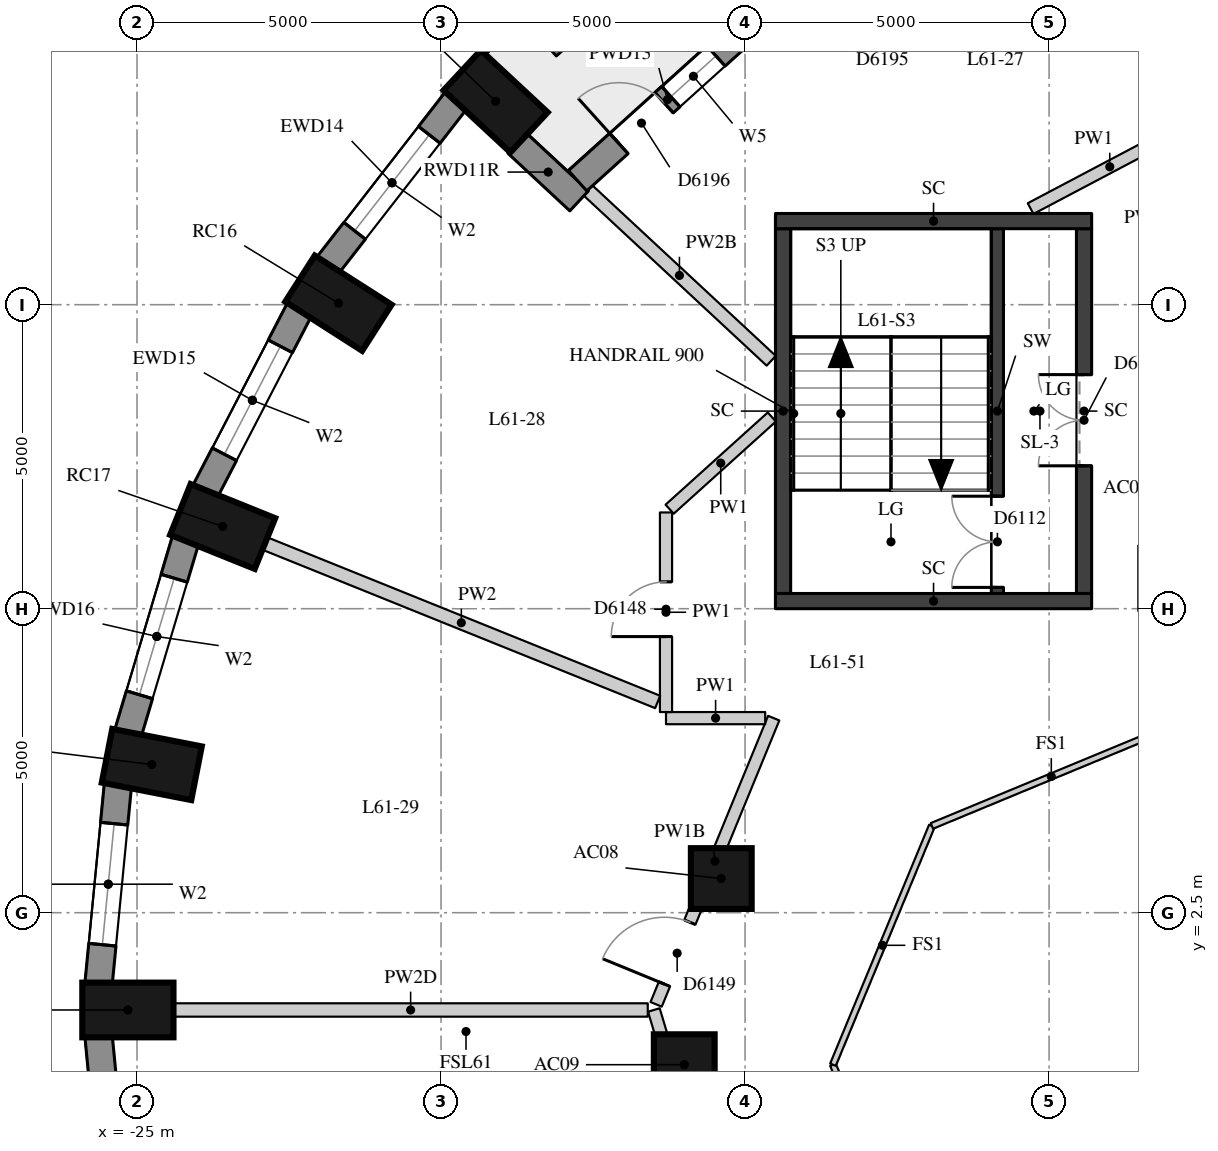
"""IFC4 building model, lengths in metres.
Left out: names, types, materials, properties, quantities, classifications, styles, units other than length and angle.
Written with IfcOpenShell. Run it as: python <this file> out.ifc"""

import sys

from ifc_helpers import new_model, si_unit, direction, frame, frame_2d, origin, origin_2d, place, context, subcontext, project, spatial, rectangle, extrude, element, fill, save


model = new_model("IFC4")
c1 = context("Model", 3, precision=1e-05, world=origin(), true_north=direction((0.0, 1.0)))
c2 = subcontext(c1, "Body", "Model", "MODEL_VIEW")
j1 = project(units=[si_unit("LENGTHUNIT", "METRE"), si_unit("PLANEANGLEUNIT", "RADIAN")], contexts=[c1])
p1 = place(None, origin())
s1 = spatial("IfcSite", under=j1, at=p1, CompositionType="ELEMENT")
p2 = place(p1, origin())
s2 = spatial("IfcBuilding", under=s1, at=p2, CompositionType="ELEMENT")
p3 = place(p2, frame((0.0, 0.0, 215.6)))
s3 = spatial("IfcBuildingStorey", under=s2, at=p3, CompositionType="ELEMENT", Elevation=215.6)
for number, where, z_axis, x_axis in (
    (1, (-19.102, 15.845, 0.0), (0.0, 0.0, 1.0), (-0.732, 0.681, 0.0)),
    (2, (-21.687, 12.525, 0.0), (0.0, 0.0, 1.0), (-0.842, 0.539, 0.0)),
    (3, (-23.591, 8.852, 0.0), (0.0, 0.0, 1.0), (-0.927, 0.374, 0.0)),
    (4, (-24.757, 4.937, 0.0), (0.0, 0.0, 1.0), (-0.981, 0.192, 0.0)),
    (5, (-25.15, 0.9, 0.0), (0.0, 0.0, 1.0), (-1.0, 0.0, 0.0)),
):
    element("IfcColumn", number, at=place(p3, frame(where, z_axis=z_axis, x_axis=x_axis)), inside=s3, PredefinedType="COLUMN", context=c2, shape_type="SweptSolid", body=[
        extrude(rectangle(XDim=1.5, YDim=0.9, at=origin_2d()), origin(), (0.0, 0.0, 1.0), 3.3),
    ])
for number, where, z_axis, x_axis in (
    (6, (-15.391, 3.062, 0.0), (0.0, 0.0, 1.0), (1.0, 0.0, 0.0)),
    (7, (-16.0, 0.0, 0.0), (0.0, 0.0, 1.0), (1.0, 0.0, 0.0)),
):
    element("IfcColumn", number, at=place(p3, frame(where, z_axis=z_axis, x_axis=x_axis)), inside=s3, PredefinedType="COLUMN", context=c2, shape_type="SweptSolid", body=[
        extrude(rectangle(XDim=1.0, YDim=1.0, at=origin_2d()), origin(), (0.0, 0.0, 1.0), 3.3),
    ])
p4 = place(p3, frame((-19.751, 15.861, 0.0), z_axis=(0.0, 0.0, 1.0), x_axis=(-0.614220816451, -0.789134201919, 0.0)))
e8 = element("IfcWall", 8, at=p4, inside=s3, PredefinedType="SOLIDWALL", context=c2, shape_type="SweptSolid", body=[
    extrude(rectangle(XDim=3.438, YDim=0.45, at=frame_2d((1.719, 0.0))), origin(), (0.0, 0.0, 1.0), 3.02),
])
p5 = place(p4, frame((0.719, 0.0, 0.4)))
e9 = element("IfcOpeningElement", 9, at=p5, cuts=e8, PredefinedType="OPENING", context=c2, shape_type="SweptSolid", body=[
    extrude(rectangle(XDim=2.0, YDim=1.75, at=frame_2d((1.0, 0.875))), frame((0.0, 0.235, 0.0), z_axis=(0.0, -1.0, 0.0), x_axis=(1.0, 0.0, 0.0)), (0.0, 0.0, 1.0), 0.47),
])
p6 = place(p3, frame((-22.327, 12.424, 0.0), z_axis=(0.0, 0.0, 1.0), x_axis=(-0.460232593174, -0.887798378113, 0.0)))
e10 = element("IfcWall", 10, at=p6, inside=s3, PredefinedType="SOLIDWALL", context=c2, shape_type="SweptSolid", body=[
    extrude(rectangle(XDim=3.371, YDim=0.45, at=frame_2d((1.685, 0.0))), origin(), (0.0, 0.0, 1.0), 3.02),
])
p7 = place(p6, frame((0.685, 0.0, 0.4)))
e11 = element("IfcOpeningElement", 11, at=p7, cuts=e10, PredefinedType="OPENING", context=c2, shape_type="SweptSolid", body=[
    extrude(rectangle(XDim=2.0, YDim=1.75, at=frame_2d((1.0, 0.875))), frame((0.0, 0.235, 0.0), z_axis=(0.0, -1.0, 0.0), x_axis=(1.0, 0.0, 0.0)), (0.0, 0.0, 1.0), 0.47),
])
p8 = place(p3, frame((-24.2, 8.634, 0.0), z_axis=(0.0, 0.0, 1.0), x_axis=(-0.285444972963, -0.958395099847, 0.0)))
e12 = element("IfcWall", 12, at=p8, inside=s3, PredefinedType="SOLIDWALL", context=c2, shape_type="SweptSolid", body=[
    extrude(rectangle(XDim=3.32, YDim=0.45, at=frame_2d((1.66, 0.0))), origin(), (0.0, 0.0, 1.0), 3.02),
])
p9 = place(p8, frame((0.66, 0.0, 0.4)))
e13 = element("IfcOpeningElement", 13, at=p9, cuts=e12, PredefinedType="OPENING", context=c2, shape_type="SweptSolid", body=[
    extrude(rectangle(XDim=2.0, YDim=1.75, at=frame_2d((1.0, 0.875))), frame((0.0, 0.235, 0.0), z_axis=(0.0, -1.0, 0.0), x_axis=(1.0, 0.0, 0.0)), (0.0, 0.0, 1.0), 0.47),
])
p10 = place(p3, frame((-25.313, 4.608, 0.0), z_axis=(0.0, 0.0, 1.0), x_axis=(-0.096824116835, -0.995301507283, 0.0)))
e14 = element("IfcWall", 14, at=p10, inside=s3, PredefinedType="SOLIDWALL", context=c2, shape_type="SweptSolid", body=[
    extrude(rectangle(XDim=3.293, YDim=0.45, at=frame_2d((1.646, 0.0))), origin(), (0.0, 0.0, 1.0), 3.02),
])
p11 = place(p10, frame((0.646, 0.0, 0.4)))
e15 = element("IfcOpeningElement", 15, at=p11, cuts=e14, PredefinedType="OPENING", context=c2, shape_type="SweptSolid", body=[
    extrude(rectangle(XDim=2.0, YDim=1.75, at=frame_2d((1.0, 0.875))), frame((0.0, 0.235, 0.0), z_axis=(0.0, -1.0, 0.0), x_axis=(1.0, 0.0, 0.0)), (0.0, 0.0, 1.0), 0.47),
])
p12 = place(p3, frame((-25.632, 0.47, 0.0), z_axis=(0.0, 0.0, 1.0), x_axis=(0.096816972749, -0.995302202242, 0.0)))
e16 = element("IfcWall", 16, at=p12, inside=s3, PredefinedType="SOLIDWALL", context=c2, shape_type="SweptSolid", body=[
    extrude(rectangle(XDim=3.293, YDim=0.45, at=frame_2d((1.646, 0.0))), origin(), (0.0, 0.0, 1.0), 3.02),
])
p13 = place(p12, frame((0.646, 0.0, 0.4)))
e17 = element("IfcOpeningElement", 17, at=p13, cuts=e16, PredefinedType="OPENING", context=c2, shape_type="SweptSolid", body=[
    extrude(rectangle(XDim=2.0, YDim=1.75, at=frame_2d((1.0, 0.875))), frame((0.0, 0.235, 0.0), z_axis=(0.0, -1.0, 0.0), x_axis=(1.0, 0.0, 0.0)), (0.0, 0.0, 1.0), 0.47),
])
p14 = place(p3, frame((-18.747, 15.155, 0.0), z_axis=(0.0, 0.0, 1.0), x_axis=(0.732349544388, -0.680928883831, 0.0)))
e18 = element("IfcWall", 18, at=p14, inside=s3, PredefinedType="SOLIDWALL", context=c2, shape_type="SweptSolid", body=[
    extrude(rectangle(XDim=1.391, YDim=0.45, at=frame_2d((0.696, 0.0))), origin(), (0.0, 0.0, 1.0), 2.57),
])
p15 = place(p3, frame((-14.799, 17.205, 0.0), z_axis=(0.0, 0.0, 1.0), x_axis=(-0.742488361714, -0.669858964798, 0.0)))
e19 = element("IfcWall", 19, at=p15, inside=s3, PredefinedType="SOLIDWALL", context=c2, shape_type="SweptSolid", body=[
    extrude(rectangle(XDim=3.98, YDim=0.45, at=frame_2d((1.99, 0.0))), origin(), (0.0, 0.0, 1.0), 3.02),
])
p16 = place(p15, frame((0.915, 0.0, 0.4)))
e20 = element("IfcOpeningElement", 20, at=p16, cuts=e19, PredefinedType="OPENING", context=c2, shape_type="SweptSolid", body=[
    extrude(rectangle(XDim=1.0, YDim=1.75, at=frame_2d((0.5, 0.875))), frame((0.0, 0.235, 0.0), z_axis=(0.0, -1.0, 0.0), x_axis=(1.0, 0.0, 0.0)), (0.0, 0.0, 1.0), 0.47),
])
p17 = place(p15, frame((2.065, 0.0, 0.0)))
e21 = element("IfcOpeningElement", 21, at=p17, cuts=e19, PredefinedType="OPENING", context=c2, shape_type="SweptSolid", body=[
    extrude(rectangle(XDim=1.0, YDim=2.15, at=frame_2d((0.5, 1.075))), frame((0.0, 0.235, 0.0), z_axis=(0.0, -1.0, 0.0), x_axis=(1.0, 0.0, 0.0)), (0.0, 0.0, 1.0), 0.47),
])
p18 = place(p3, frame((-17.0, 18.055, 0.0), z_axis=(0.0, 0.0, 1.0), x_axis=(-0.743422275143, -0.668822338758, 0.0)))
e22 = element("IfcWall", 22, at=p18, inside=s3, PredefinedType="USERDEFINED", context=c2, shape_type="SweptSolid", body=[
    extrude(rectangle(XDim=1.8, YDim=0.7, at=frame_2d((0.9, 0.0))), origin(), (0.0, 0.0, 1.0), 0.75),
])
p19 = place(p3, frame((-10.85, 7.75, 0.0), z_axis=(0.0, 0.0, 1.0), x_axis=(0.0, 1.0, 0.0)))
e23 = element("IfcWall", 23, at=p19, inside=s3, PredefinedType="SHEAR", context=c2, shape_type="SweptSolid", body=[
    extrude(rectangle(XDim=6.0, YDim=0.2, at=frame_2d((3.0, 0.0))), origin(), (0.0, 0.0, 1.0), 3.02),
])
p20 = place(p19, frame((0.1, 0.0, 0.0)))
e24 = element("IfcOpeningElement", 24, at=p20, cuts=e23, PredefinedType="OPENING", context=c2, shape_type="SweptSolid", body=[
    extrude(rectangle(XDim=1.5, YDim=2.1, at=frame_2d((0.75, 1.05))), frame((0.0, 0.11, 0.0), z_axis=(0.0, -1.0, 0.0), x_axis=(1.0, 0.0, 0.0)), (0.0, 0.0, 1.0), 0.22),
])
p21 = place(p3, frame((-14.375, 7.75, -0.28), z_axis=(0.0, 0.0, 1.0), x_axis=(0.0, 1.0, 0.0)))
e25 = element("IfcWall", 25, at=p21, inside=s3, PredefinedType="SHEAR", context=c2, shape_type="SweptSolid", body=[
    extrude(rectangle(XDim=6.0, YDim=0.25, at=frame_2d((3.0, 0.0))), origin(), (0.0, 0.0, 1.0), 3.3),
])
p22 = place(p3, frame((-9.425, 7.75, -0.28), z_axis=(0.0, 0.0, 1.0), x_axis=(0.0, 1.0, 0.0)))
e26 = element("IfcWall", 26, at=p22, inside=s3, PredefinedType="SHEAR", context=c2, shape_type="SweptSolid", body=[
    extrude(rectangle(XDim=6.0, YDim=0.25, at=frame_2d((3.0, 0.0))), origin(), (0.0, 0.0, 1.0), 3.3),
])
p23 = place(p22, frame((2.1, 0.0, 0.28)))
e27 = element("IfcOpeningElement", 27, at=p23, cuts=e26, PredefinedType="OPENING", context=c2, shape_type="SweptSolid", body=[
    extrude(rectangle(XDim=1.5, YDim=2.1, at=frame_2d((0.75, 1.05))), frame((0.0, 0.135, 0.0), z_axis=(0.0, -1.0, 0.0), x_axis=(1.0, 0.0, 0.0)), (0.0, 0.0, 1.0), 0.27),
])
for number, where, z_axis, x_axis in (
    (28, (-14.5, 13.875, -0.28), (0.0, 0.0, 1.0), (1.0, 0.0, 0.0)),
    (29, (-14.5, 7.625, -0.28), (0.0, 0.0, 1.0), (1.0, 0.0, 0.0)),
):
    element("IfcWall", number, at=place(p3, frame(where, z_axis=z_axis, x_axis=x_axis)), inside=s3, PredefinedType="SHEAR", context=c2, shape_type="SweptSolid", body=[
        extrude(rectangle(XDim=5.2, YDim=0.25, at=frame_2d((2.6, 0.0))), origin(), (0.0, 0.0, 1.0), 3.3),
    ])
p24 = place(p3, frame((-14.56, -5.567, 0.0), z_axis=(0.0, 0.0, 1.0), x_axis=(-0.287410918602, 0.95780737305, 0.0)))
e30 = element("IfcWall", 30, at=p24, inside=s3, PredefinedType="PARTITIONING", context=c2, shape_type="SweptSolid", body=[
    extrude(rectangle(XDim=6.751, YDim=0.2, at=frame_2d((3.376, 0.0))), origin(), (0.0, 0.0, 1.0), 2.52),
])
p25 = place(p24, frame((3.561, 0.0, 0.0)))
e31 = element("IfcOpeningElement", 31, at=p25, cuts=e30, PredefinedType="OPENING", context=c2, shape_type="SweptSolid", body=[
    extrude(rectangle(XDim=1.1, YDim=2.1, at=frame_2d((0.55, 1.05))), frame((0.0, 0.11, 0.0), z_axis=(0.0, -1.0, 0.0), x_axis=(1.0, 0.0, 0.0)), (0.0, 0.0, 1.0), 0.22),
])
p26 = place(p24, frame((0.41, 0.0, 0.0)))
e32 = element("IfcOpeningElement", 32, at=p26, cuts=e30, PredefinedType="OPENING", context=c2, shape_type="SweptSolid", body=[
    extrude(rectangle(XDim=1.2, YDim=2.1, at=frame_2d((0.6, 1.05))), frame((0.0, 0.11, 0.0), z_axis=(0.0, -1.0, 0.0), x_axis=(1.0, 0.0, 0.0)), (0.0, 0.0, 1.0), 0.22),
])
p27 = place(p3, frame((-16.462, 0.993, 0.0), z_axis=(0.0, 0.0, 1.0), x_axis=(0.37991958703, 0.925019517303, 0.0)))
e33 = element("IfcWall", 33, at=p27, inside=s3, PredefinedType="PARTITIONING", context=c2, shape_type="SweptSolid", body=[
    extrude(rectangle(XDim=5.089, YDim=0.2, at=frame_2d((2.544, 0.0))), origin(), (0.0, 0.0, 1.0), 2.52),
])
p28 = place(p27, frame((0.36, 0.0, 0.0)))
e34 = element("IfcOpeningElement", 34, at=p28, cuts=e33, PredefinedType="OPENING", context=c2, shape_type="SweptSolid", body=[
    extrude(rectangle(XDim=1.1, YDim=2.1, at=frame_2d((0.55, 1.05))), frame((0.0, 0.11, 0.0), z_axis=(0.0, -1.0, 0.0), x_axis=(1.0, 0.0, 0.0)), (0.0, 0.0, 1.0), 0.22),
])
p29 = place(p3, frame((-14.669, 5.7, 0.0), z_axis=(0.0, 0.0, 1.0), x_axis=(-1.0, 0.0, 0.0)))
e35 = element("IfcWall", 35, at=p29, inside=s3, PredefinedType="PARTITIONING", context=c2, shape_type="SweptSolid", body=[
    extrude(rectangle(XDim=1.631, YDim=0.2, at=frame_2d((0.815, 0.0))), origin(), (0.0, 0.0, 1.0), 3.02),
])
p30 = place(p3, frame((-16.3, 5.8, 0.0), z_axis=(0.0, 0.0, 1.0), x_axis=(0.0, 1.0, 0.0)))
e36 = element("IfcWall", 36, at=p30, inside=s3, PredefinedType="PARTITIONING", context=c2, shape_type="SweptSolid", body=[
    extrude(rectangle(XDim=3.283, YDim=0.2, at=frame_2d((1.641, 0.0))), origin(), (0.0, 0.0, 1.0), 3.02),
])
p31 = place(p30, frame((1.241, 0.0, 0.0)))
e37 = element("IfcOpeningElement", 37, at=p31, cuts=e36, PredefinedType="OPENING", context=c2, shape_type="SweptSolid", body=[
    extrude(rectangle(XDim=0.9, YDim=2.1, at=frame_2d((0.45, 1.05))), frame((0.0, 0.11, 0.0), z_axis=(0.0, -1.0, 0.0), x_axis=(1.0, 0.0, 0.0)), (0.0, 0.0, 1.0), 0.22),
])
p32 = place(p3, frame((-16.24, 9.136, 0.0), z_axis=(0.0, 0.0, 1.0), x_axis=(0.74251608424, 0.66982823518, 0.0)))
e38 = element("IfcWall", 38, at=p32, inside=s3, PredefinedType="PARTITIONING", context=c2, shape_type="SweptSolid", body=[
    extrude(rectangle(XDim=2.264, YDim=0.2, at=frame_2d((1.132, 0.0))), origin(), (0.0, 0.0, 1.0), 3.02),
])
p33 = place(p3, frame((-10.304, 14.081, 0.0), z_axis=(0.0, 0.0, 1.0), x_axis=(0.884325802624, 0.466870297635, 0.0)))
e39 = element("IfcWall", 39, at=p33, inside=s3, PredefinedType="PARTITIONING", context=c2, shape_type="SweptSolid", body=[
    extrude(rectangle(XDim=2.945, YDim=0.2, at=frame_2d((1.472, 0.0))), origin(), (0.0, 0.0, 1.0), 3.02),
])
p34 = place(p3, frame((-17.589, 14.385, 0.0), z_axis=(0.0, 0.0, 1.0), x_axis=(0.732287016614, -0.680996127227, 0.0)))
e40 = element("IfcWall", 40, at=p34, inside=s3, PredefinedType="PARTITIONING", context=c2, shape_type="SweptSolid", body=[
    extrude(rectangle(XDim=4.122, YDim=0.22, at=frame_2d((2.061, 0.0))), origin(), (0.0, 0.0, 1.0), 2.57),
])
p35 = place(p3, frame((-22.896, 8.571, 0.0), z_axis=(0.0, 0.0, 1.0), x_axis=(0.927387137769, -0.374103056256, 0.0)))
e41 = element("IfcWall", 41, at=p35, inside=s3, PredefinedType="PARTITIONING", context=c2, shape_type="SweptSolid", body=[
    extrude(rectangle(XDim=6.964, YDim=0.22, at=frame_2d((3.482, 0.0))), origin(), (0.0, 0.0, 1.0), 3.02),
])
p36 = place(p3, frame((-24.4, 0.9, 0.0), z_axis=(0.0, 0.0, 1.0), x_axis=(1.0, 0.0, 0.0)))
e42 = element("IfcWall", 42, at=p36, inside=s3, PredefinedType="PARTITIONING", context=c2, shape_type="SweptSolid", body=[
    extrude(rectangle(XDim=7.8, YDim=0.22, at=frame_2d((3.9, 0.0))), origin(), (0.0, 0.0, 1.0), 2.47),
])
for number, where, z_axis, x_axis in (
    (43, (-11.927, -3.927, 0.0), (0.0, 0.0, 1.0), (-0.383, 0.924, 0.0)),
    (44, (-13.554, 0.0, 0.0), (0.0, 0.0, 1.0), (0.383, 0.924, 0.0)),
    (45, (-11.927, 3.927, 0.0), (0.0, 0.0, 1.0), (0.924, 0.383, 0.0)),
):
    element("IfcWall", number, at=place(p3, frame(where, z_axis=z_axis, x_axis=x_axis)), inside=s3, PredefinedType="PARTITIONING", context=c2, shape_type="SweptSolid", body=[
        extrude(rectangle(XDim=4.251, YDim=0.1, at=frame_2d((2.125, 0.0))), origin(), (0.0, 0.0, 1.0), 3.02),
    ])
p37 = place(p5, origin())
e46 = element("IfcWindow", 46, at=p37, inside=s3, PartitioningType="SINGLE_PANEL", PredefinedType="WINDOW", context=c2, shape_type="SweptSolid", body=[
    extrude(rectangle(XDim=2.0, YDim=1.75, at=frame_2d((1.0, 0.875))), frame((0.0, 0.035, 0.0), z_axis=(0.0, -1.0, 0.0), x_axis=(1.0, 0.0, 0.0)), (0.0, 0.0, 1.0), 0.06),
])
fill(e9, e46)
p38 = place(p7, origin())
e47 = element("IfcWindow", 47, at=p38, inside=s3, PartitioningType="SINGLE_PANEL", PredefinedType="WINDOW", context=c2, shape_type="SweptSolid", body=[
    extrude(rectangle(XDim=2.0, YDim=1.75, at=frame_2d((1.0, 0.875))), frame((0.0, 0.035, 0.0), z_axis=(0.0, -1.0, 0.0), x_axis=(1.0, 0.0, 0.0)), (0.0, 0.0, 1.0), 0.06),
])
fill(e11, e47)
p39 = place(p9, origin())
e48 = element("IfcWindow", 48, at=p39, inside=s3, PartitioningType="SINGLE_PANEL", PredefinedType="WINDOW", context=c2, shape_type="SweptSolid", body=[
    extrude(rectangle(XDim=2.0, YDim=1.75, at=frame_2d((1.0, 0.875))), frame((0.0, 0.035, 0.0), z_axis=(0.0, -1.0, 0.0), x_axis=(1.0, 0.0, 0.0)), (0.0, 0.0, 1.0), 0.06),
])
fill(e13, e48)
p40 = place(p11, origin())
e49 = element("IfcWindow", 49, at=p40, inside=s3, PartitioningType="SINGLE_PANEL", PredefinedType="WINDOW", context=c2, shape_type="SweptSolid", body=[
    extrude(rectangle(XDim=2.0, YDim=1.75, at=frame_2d((1.0, 0.875))), frame((0.0, 0.035, 0.0), z_axis=(0.0, -1.0, 0.0), x_axis=(1.0, 0.0, 0.0)), (0.0, 0.0, 1.0), 0.06),
])
fill(e15, e49)
p41 = place(p16, origin())
e50 = element("IfcWindow", 50, at=p41, inside=s3, PartitioningType="SINGLE_PANEL", PredefinedType="WINDOW", context=c2, shape_type="SweptSolid", body=[
    extrude(rectangle(XDim=1.0, YDim=1.75, at=frame_2d((0.5, 0.875))), frame((0.0, 0.035, 0.0), z_axis=(0.0, -1.0, 0.0), x_axis=(1.0, 0.0, 0.0)), (0.0, 0.0, 1.0), 0.06),
])
fill(e20, e50)
p42 = place(p17, frame((1.0, 0.0, 0.0), z_axis=(0.0, 0.0, 1.0), x_axis=(-1.0, 0.0, 0.0)))
e51 = element("IfcDoor", 51, at=p42, inside=s3, OperationType="SINGLE_SWING_LEFT", PredefinedType="DOOR", context=c2, shape_type="SweptSolid", body=[
    extrude(rectangle(XDim=1.0, YDim=2.15, at=frame_2d((0.5, 1.075))), frame((0.0, 0.075, 0.0), z_axis=(0.0, -1.0, 0.0), x_axis=(1.0, 0.0, 0.0)), (0.0, 0.0, 1.0), 0.05),
])
fill(e21, e51)
p43 = place(p20, origin())
e52 = element("IfcDoor", 52, at=p43, inside=s3, OperationType="DOUBLE_DOOR_SINGLE_SWING", PredefinedType="DOOR", context=c2, shape_type="SweptSolid", body=[
    extrude(rectangle(XDim=1.5, YDim=2.1, at=frame_2d((0.75, 1.05))), frame((0.0, 0.025, 0.0), z_axis=(0.0, -1.0, 0.0), x_axis=(1.0, 0.0, 0.0)), (0.0, 0.0, 1.0), 0.05),
])
fill(e24, e52)
p44 = place(p23, origin())
e53 = element("IfcDoor", 53, at=p44, inside=s3, OperationType="DOUBLE_DOOR_SINGLE_SWING", PredefinedType="DOOR", context=c2, shape_type="SweptSolid", body=[
    extrude(rectangle(XDim=1.5, YDim=2.1, at=frame_2d((0.75, 1.05))), frame((0.0, 0.025, 0.0), z_axis=(0.0, -1.0, 0.0), x_axis=(1.0, 0.0, 0.0)), (0.0, 0.0, 1.0), 0.05),
])
fill(e27, e53)
p45 = place(p31, origin())
e54 = element("IfcDoor", 54, at=p45, inside=s3, OperationType="SINGLE_SWING_LEFT", PredefinedType="DOOR", context=c2, shape_type="SweptSolid", body=[
    extrude(rectangle(XDim=0.9, YDim=2.1, at=frame_2d((0.45, 1.05))), frame((0.0, 0.025, 0.0), z_axis=(0.0, -1.0, 0.0), x_axis=(1.0, 0.0, 0.0)), (0.0, 0.0, 1.0), 0.05),
])
fill(e37, e54)
p46 = place(p28, origin())
e55 = element("IfcDoor", 55, at=p46, inside=s3, OperationType="SINGLE_SWING_LEFT", PredefinedType="DOOR", context=c2, shape_type="SweptSolid", body=[
    extrude(rectangle(XDim=1.1, YDim=2.1, at=frame_2d((0.55, 1.05))), frame((0.0, 0.025, 0.0), z_axis=(0.0, -1.0, 0.0), x_axis=(1.0, 0.0, 0.0)), (0.0, 0.0, 1.0), 0.05),
])
fill(e34, e55)
save(model, sys.argv[1])
